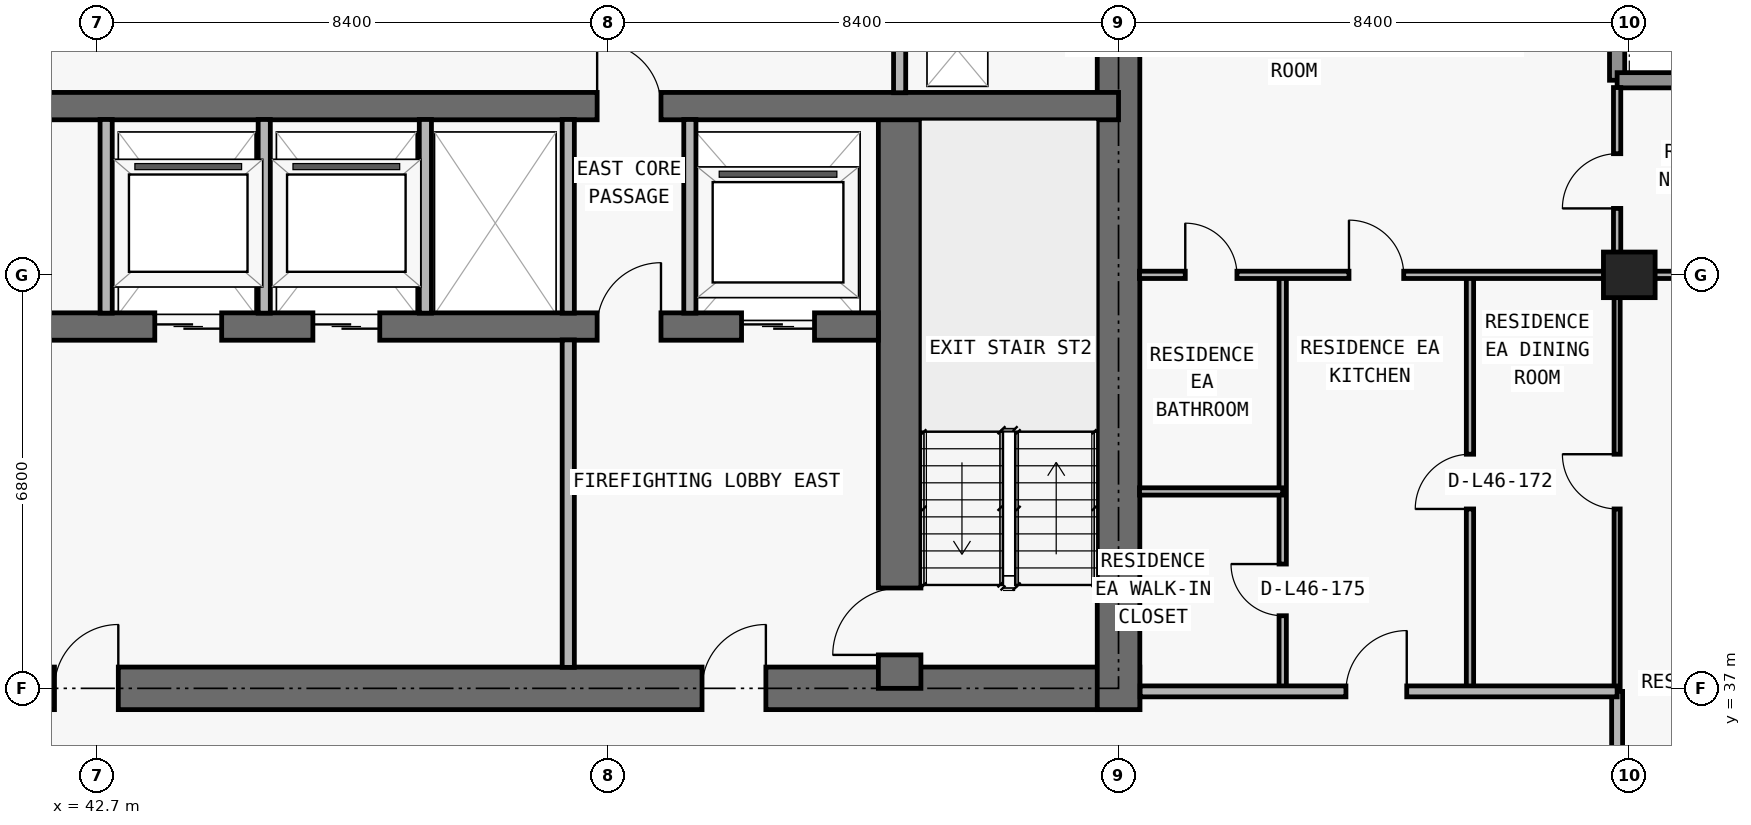
"""IFC4 building model, lengths in metres.
Left out: names, types, materials, properties, quantities, classifications, styles, units other than length and angle.
Written with IfcOpenShell. Run it as: python <this file> out.ifc"""

import sys

from ifc_helpers import new_model, si_unit, direction, frame, frame_2d, origin, origin_2d, place, context, subcontext, project, spatial, rectangle, extrude, element, fill, save


model = new_model("IFC4")
c1 = context("Model", 3, precision=1e-05, world=origin(), true_north=direction((0.0, 1.0)))
c2 = subcontext(c1, "Body", "Model", "MODEL_VIEW")
j1 = project(units=[si_unit("LENGTHUNIT", "METRE"), si_unit("PLANEANGLEUNIT", "RADIAN")], contexts=[c1])
p1 = place(None, origin())
s1 = spatial("IfcSite", under=j1, at=p1, CompositionType="ELEMENT")
p2 = place(p1, origin())
s2 = spatial("IfcBuilding", under=s1, at=p2, CompositionType="ELEMENT")
p3 = place(p2, frame((0.0, 0.0, 167.1)))
s3 = spatial("IfcBuildingStorey", under=s2, at=p3, CompositionType="ELEMENT", Elevation=167.1)
p4 = place(p3, frame((67.9, 43.8, 0.0), z_axis=(0.0, 0.0, 1.0), x_axis=(1.0, 0.0, 0.0)))
e1 = element("IfcColumn", 1, at=p4, inside=s3, PredefinedType="COLUMN", context=c2, shape_type="SweptSolid", body=[
    extrude(rectangle(XDim=0.85, YDim=0.75, at=origin_2d()), origin(), (0.0, 0.0, 1.0), 3.05),
])
p5 = place(p3, frame((17.95, 37.0, 0.0), z_axis=(0.0, 0.0, 1.0), x_axis=(1.0, 0.0, 0.0)))
e2 = element("IfcWall", 2, at=p5, inside=s3, PredefinedType="SHEAR", context=c2, shape_type="SweptSolid", body=[
    extrude(rectangle(XDim=41.9, YDim=0.7, at=frame_2d((20.95, 0.0))), origin(), (0.0, 0.0, 1.0), 3.05),
])
p6 = place(p5, frame((14.35, 0.0, 0.0)))
e3 = element("IfcOpeningElement", 3, at=p6, cuts=e2, PredefinedType="OPENING", context=c2, shape_type="SweptSolid", body=[
    extrude(rectangle(XDim=1.1, YDim=2.15, at=frame_2d((0.55, 1.075))), frame((0.0, 0.36, 0.0), z_axis=(0.0, -1.0, 0.0), x_axis=(1.0, 0.0, 0.0)), (0.0, 0.0, 1.0), 0.72),
])
p7 = place(p5, frame((6.2, 0.0, 0.0)))
e4 = element("IfcOpeningElement", 4, at=p7, cuts=e2, PredefinedType="OPENING", context=c2, shape_type="SweptSolid", body=[
    extrude(rectangle(XDim=1.05, YDim=2.15, at=frame_2d((0.525, 1.075))), frame((0.0, 0.36, 0.0), z_axis=(0.0, -1.0, 0.0), x_axis=(1.0, 0.0, 0.0)), (0.0, 0.0, 1.0), 0.72),
])
p8 = place(p5, frame((34.7, 0.0, 0.0)))
e5 = element("IfcOpeningElement", 5, at=p8, cuts=e2, PredefinedType="OPENING", context=c2, shape_type="SweptSolid", body=[
    extrude(rectangle(XDim=1.05, YDim=2.15, at=frame_2d((0.525, 1.075))), frame((0.0, 0.36, 0.0), z_axis=(0.0, -1.0, 0.0), x_axis=(1.0, 0.0, 0.0)), (0.0, 0.0, 1.0), 0.72),
])
p9 = place(p5, frame((10.812, 0.0, 0.0)))
e6 = element("IfcOpeningElement", 6, at=p9, cuts=e2, PredefinedType="OPENING", context=c2, shape_type="SweptSolid", body=[
    extrude(rectangle(XDim=1.05, YDim=2.15, at=frame_2d((0.525, 1.075))), frame((0.0, 0.36, 0.0), z_axis=(0.0, -1.0, 0.0), x_axis=(1.0, 0.0, 0.0)), (0.0, 0.0, 1.0), 0.72),
])
p10 = place(p5, frame((24.05, 0.0, 0.0)))
e7 = element("IfcOpeningElement", 7, at=p10, cuts=e2, PredefinedType="OPENING", context=c2, shape_type="SweptSolid", body=[
    extrude(rectangle(XDim=1.05, YDim=2.15, at=frame_2d((0.525, 1.075))), frame((0.0, 0.36, 0.0), z_axis=(0.0, -1.0, 0.0), x_axis=(1.0, 0.0, 0.0)), (0.0, 0.0, 1.0), 0.72),
])
p11 = place(p3, frame((59.5, 36.65, 0.0), z_axis=(0.0, 0.0, 1.0), x_axis=(0.0, 1.0, 0.0)))
e8 = element("IfcWall", 8, at=p11, inside=s3, PredefinedType="SHEAR", context=c2, shape_type="SweptSolid", body=[
    extrude(rectangle(XDim=13.95, YDim=0.7, at=frame_2d((6.975, 0.0))), origin(), (0.0, 0.0, 1.0), 3.05),
])
p12 = place(p3, frame((55.9, 37.0, 0.0), z_axis=(0.0, 0.0, 1.0), x_axis=(0.0, 1.0, 0.0)))
e9 = element("IfcWall", 9, at=p12, inside=s3, PredefinedType="SHEAR", context=c2, shape_type="SweptSolid", body=[
    extrude(rectangle(XDim=9.575, YDim=0.7, at=frame_2d((4.788, 0.0))), origin(), (0.0, 0.0, 1.0), 3.05),
])
p13 = place(p12, frame((0.55, 0.0, 0.0)))
e10 = element("IfcOpeningElement", 10, at=p13, cuts=e9, PredefinedType="OPENING", context=c2, shape_type="SweptSolid", body=[
    extrude(rectangle(XDim=1.1, YDim=2.15, at=frame_2d((0.55, 1.075))), frame((0.0, 0.36, 0.0), z_axis=(0.0, -1.0, 0.0), x_axis=(1.0, 0.0, 0.0)), (0.0, 0.0, 1.0), 0.72),
])
p14 = place(p3, frame((22.25, 42.95, 0.0), z_axis=(0.0, 0.0, 1.0), x_axis=(1.0, 0.0, 0.0)))
e11 = element("IfcWall", 11, at=p14, inside=s3, PredefinedType="SHEAR", context=c2, shape_type="SweptSolid", body=[
    extrude(rectangle(XDim=33.3, YDim=0.45, at=frame_2d((16.65, 0.0))), origin(), (0.0, 0.0, 1.0), 3.05),
])
p15 = place(p14, frame((1.05, 0.0, 0.0)))
e12 = element("IfcOpeningElement", 12, at=p15, cuts=e11, PredefinedType="OPENING", context=c2, shape_type="SweptSolid", body=[
    extrude(rectangle(XDim=1.2, YDim=2.2, at=frame_2d((0.6, 1.1))), frame((0.0, 0.235, 0.0), z_axis=(0.0, -1.0, 0.0), x_axis=(1.0, 0.0, 0.0)), (0.0, 0.0, 1.0), 0.47),
])
p16 = place(p14, frame((31.05, 0.0, 0.0)))
e13 = element("IfcOpeningElement", 13, at=p16, cuts=e11, PredefinedType="OPENING", context=c2, shape_type="SweptSolid", body=[
    extrude(rectangle(XDim=1.2, YDim=2.2, at=frame_2d((0.6, 1.1))), frame((0.0, 0.235, 0.0), z_axis=(0.0, -1.0, 0.0), x_axis=(1.0, 0.0, 0.0)), (0.0, 0.0, 1.0), 0.47),
])
p17 = place(p14, frame((21.4, 0.0, 0.0)))
e14 = element("IfcOpeningElement", 14, at=p17, cuts=e11, PredefinedType="OPENING", context=c2, shape_type="SweptSolid", body=[
    extrude(rectangle(XDim=1.1, YDim=2.2, at=frame_2d((0.55, 1.1))), frame((0.0, 0.235, 0.0), z_axis=(0.0, -1.0, 0.0), x_axis=(1.0, 0.0, 0.0)), (0.0, 0.0, 1.0), 0.47),
])
p18 = place(p14, frame((24.0, 0.0, 0.0)))
e15 = element("IfcOpeningElement", 15, at=p18, cuts=e11, PredefinedType="OPENING", context=c2, shape_type="SweptSolid", body=[
    extrude(rectangle(XDim=1.1, YDim=2.2, at=frame_2d((0.55, 1.1))), frame((0.0, 0.235, 0.0), z_axis=(0.0, -1.0, 0.0), x_axis=(1.0, 0.0, 0.0)), (0.0, 0.0, 1.0), 0.47),
])
p19 = place(p14, frame((3.625, 0.0, 0.0)))
e16 = element("IfcOpeningElement", 16, at=p19, cuts=e11, PredefinedType="OPENING", context=c2, shape_type="SweptSolid", body=[
    extrude(rectangle(XDim=1.05, YDim=2.15, at=frame_2d((0.525, 1.075))), frame((0.0, 0.235, 0.0), z_axis=(0.0, -1.0, 0.0), x_axis=(1.0, 0.0, 0.0)), (0.0, 0.0, 1.0), 0.47),
])
p20 = place(p14, frame((28.675, 0.0, 0.0)))
e17 = element("IfcOpeningElement", 17, at=p20, cuts=e11, PredefinedType="OPENING", context=c2, shape_type="SweptSolid", body=[
    extrude(rectangle(XDim=1.05, YDim=2.15, at=frame_2d((0.525, 1.075))), frame((0.0, 0.235, 0.0), z_axis=(0.0, -1.0, 0.0), x_axis=(1.0, 0.0, 0.0)), (0.0, 0.0, 1.0), 0.47),
])
p21 = place(p14, frame((15.975, 0.0, 0.0)))
e18 = element("IfcOpeningElement", 18, at=p21, cuts=e11, PredefinedType="OPENING", context=c2, shape_type="SweptSolid", body=[
    extrude(rectangle(XDim=1.0, YDim=2.2, at=frame_2d((0.5, 1.1))), frame((0.0, 0.235, 0.0), z_axis=(0.0, -1.0, 0.0), x_axis=(1.0, 0.0, 0.0)), (0.0, 0.0, 1.0), 0.47),
])
p22 = place(p3, frame((18.3, 46.575, 0.0), z_axis=(0.0, 0.0, 1.0), x_axis=(1.0, 0.0, 0.0)))
e19 = element("IfcWall", 19, at=p22, inside=s3, PredefinedType="SHEAR", context=c2, shape_type="SweptSolid", body=[
    extrude(rectangle(XDim=41.2, YDim=0.45, at=frame_2d((20.6, 0.0))), origin(), (0.0, 0.0, 1.0), 3.05),
])
p23 = place(p22, frame((7.575, 0.0, 0.0)))
e20 = element("IfcOpeningElement", 20, at=p23, cuts=e19, PredefinedType="OPENING", context=c2, shape_type="SweptSolid", body=[
    extrude(rectangle(XDim=1.05, YDim=2.15, at=frame_2d((0.525, 1.075))), frame((0.0, 0.235, 0.0), z_axis=(0.0, -1.0, 0.0), x_axis=(1.0, 0.0, 0.0)), (0.0, 0.0, 1.0), 0.47),
])
p24 = place(p22, frame((32.625, 0.0, 0.0)))
e21 = element("IfcOpeningElement", 21, at=p24, cuts=e19, PredefinedType="OPENING", context=c2, shape_type="SweptSolid", body=[
    extrude(rectangle(XDim=1.05, YDim=2.15, at=frame_2d((0.525, 1.075))), frame((0.0, 0.235, 0.0), z_axis=(0.0, -1.0, 0.0), x_axis=(1.0, 0.0, 0.0)), (0.0, 0.0, 1.0), 0.47),
])
p25 = place(p3, frame((67.7, 50.45, 0.0), z_axis=(0.0, 0.0, 1.0), x_axis=(0.0, -1.0, 0.0)))
e22 = element("IfcWall", 22, at=p25, inside=s3, PredefinedType="ELEMENTEDWALL", context=c2, shape_type="SweptSolid", body=[
    extrude(rectangle(XDim=3.45, YDim=0.25, at=frame_2d((1.725, 0.0))), origin(), (0.0, 0.0, 1.0), 3.05),
])
p26 = place(p3, frame((67.7, 47.0, 0.0), z_axis=(0.0, 0.0, 1.0), x_axis=(1.0, 0.0, 0.0)))
e23 = element("IfcWall", 23, at=p26, inside=s3, PredefinedType="ELEMENTEDWALL", context=c2, shape_type="SweptSolid", body=[
    extrude(rectangle(XDim=3.85, YDim=0.25, at=frame_2d((1.925, 0.0))), origin(), (0.0, 0.0, 1.0), 3.05),
])
for number, where, z_axis, x_axis in (
    (24, (42.85, 43.17, 0.0), (0.0, 0.0, 1.0), (0.0, 1.0, 0.0)),
    (25, (45.45, 43.17, 0.0), (0.0, 0.0, 1.0), (0.0, 1.0, 0.0)),
    (26, (48.1, 43.17, 0.0), (0.0, 0.0, 1.0), (0.0, 1.0, 0.0)),
):
    element("IfcWall", number, at=place(p3, frame(where, z_axis=z_axis, x_axis=x_axis)), inside=s3, PredefinedType="PARTITIONING", context=c2, shape_type="SweptSolid", body=[
        extrude(rectangle(XDim=3.185, YDim=0.2, at=frame_2d((1.593, 0.0))), origin(), (0.0, 0.0, 1.0), 3.05),
    ])
p27 = place(p3, frame((50.45, 37.345, 0.0), z_axis=(0.0, 0.0, 1.0), x_axis=(0.0, 1.0, 0.0)))
e27 = element("IfcWall", 27, at=p27, inside=s3, PredefinedType="PARTITIONING", context=c2, shape_type="SweptSolid", body=[
    extrude(rectangle(XDim=5.385, YDim=0.2, at=frame_2d((2.692, 0.0))), origin(), (0.0, 0.0, 1.0), 3.05),
])
for number, where, z_axis, x_axis in (
    (28, (50.45, 43.17, 0.0), (0.0, 0.0, 1.0), (0.0, 1.0, 0.0)),
    (29, (52.45, 43.17, 0.0), (0.0, 0.0, 1.0), (0.0, 1.0, 0.0)),
):
    element("IfcWall", number, at=place(p3, frame(where, z_axis=z_axis, x_axis=x_axis)), inside=s3, PredefinedType="PARTITIONING", context=c2, shape_type="SweptSolid", body=[
        extrude(rectangle(XDim=3.185, YDim=0.2, at=frame_2d((1.593, 0.0))), origin(), (0.0, 0.0, 1.0), 3.05),
    ])
p28 = place(p3, frame((55.9, 46.795, 0.0), z_axis=(0.0, 0.0, 1.0), x_axis=(0.0, 1.0, 0.0)))
e30 = element("IfcWall", 30, at=p28, inside=s3, PredefinedType="PARTITIONING", context=c2, shape_type="SweptSolid", body=[
    extrude(rectangle(XDim=3.16, YDim=0.2, at=frame_2d((1.58, 0.0))), origin(), (0.0, 0.0, 1.0), 3.05),
])
p29 = place(p3, frame((62.2, 37.0, 0.0), z_axis=(0.0, 0.0, 1.0), x_axis=(0.0, 1.0, 0.0)))
e31 = element("IfcWall", 31, at=p29, inside=s3, PredefinedType="PARTITIONING", context=c2, shape_type="SweptSolid", body=[
    extrude(rectangle(XDim=6.8, YDim=0.12, at=frame_2d((3.4, 0.0))), origin(), (0.0, 0.0, 1.0), 3.05),
])
p30 = place(p29, frame((1.194, 0.0, 0.0)))
e32 = element("IfcOpeningElement", 32, at=p30, cuts=e31, PredefinedType="OPENING", context=c2, shape_type="SweptSolid", body=[
    extrude(rectangle(XDim=0.85, YDim=2.1, at=frame_2d((0.425, 1.05))), frame((0.0, 0.07, 0.0), z_axis=(0.0, -1.0, 0.0), x_axis=(1.0, 0.0, 0.0)), (0.0, 0.0, 1.0), 0.14),
])
p31 = place(p3, frame((65.28, 37.0, 0.0), z_axis=(0.0, 0.0, 1.0), x_axis=(0.0, 1.0, 0.0)))
e33 = element("IfcWall", 33, at=p31, inside=s3, PredefinedType="PARTITIONING", context=c2, shape_type="SweptSolid", body=[
    extrude(rectangle(XDim=6.8, YDim=0.12, at=frame_2d((3.4, 0.0))), origin(), (0.0, 0.0, 1.0), 3.05),
])
p32 = place(p31, frame((2.95, 0.0, 0.0)))
e34 = element("IfcOpeningElement", 34, at=p32, cuts=e33, PredefinedType="OPENING", context=c2, shape_type="SweptSolid", body=[
    extrude(rectangle(XDim=0.9, YDim=2.15, at=frame_2d((0.45, 1.075))), frame((0.0, 0.07, 0.0), z_axis=(0.0, -1.0, 0.0), x_axis=(1.0, 0.0, 0.0)), (0.0, 0.0, 1.0), 0.14),
])
p33 = place(p3, frame((67.7, 33.705, 0.0), z_axis=(0.0, 0.0, 1.0), x_axis=(0.0, 1.0, 0.0)))
e35 = element("IfcWall", 35, at=p33, inside=s3, PredefinedType="PARTITIONING", context=c2, shape_type="SweptSolid", body=[
    extrude(rectangle(XDim=3.245, YDim=0.18, at=frame_2d((1.623, 0.0))), origin(), (0.0, 0.0, 1.0), 2.263),
])
p34 = place(p3, frame((67.7, 37.0, 0.0), z_axis=(0.0, 0.0, 1.0), x_axis=(0.0, 1.0, 0.0)))
e36 = element("IfcWall", 36, at=p34, inside=s3, PredefinedType="MOVABLE", context=c2, shape_type="SweptSolid", body=[
    extrude(rectangle(XDim=6.8, YDim=0.1, at=frame_2d((3.4, 0.0))), origin(), (0.0, 0.0, 1.0), 2.263),
])
p35 = place(p34, frame((2.95, 0.0, 0.0)))
e37 = element("IfcOpeningElement", 37, at=p35, cuts=e36, PredefinedType="OPENING", context=c2, shape_type="SweptSolid", body=[
    extrude(rectangle(XDim=0.9, YDim=2.15, at=frame_2d((0.45, 1.075))), frame((0.0, 0.06, 0.0), z_axis=(0.0, -1.0, 0.0), x_axis=(1.0, 0.0, 0.0)), (0.0, 0.0, 1.0), 0.12),
])
p36 = place(p3, frame((67.7, 43.805, 0.0), z_axis=(0.0, 0.0, 1.0), x_axis=(0.0, 1.0, 0.0)))
e38 = element("IfcWall", 38, at=p36, inside=s3, PredefinedType="PARTITIONING", context=c2, shape_type="SweptSolid", body=[
    extrude(rectangle(XDim=3.075, YDim=0.12, at=frame_2d((1.538, 0.0))), origin(), (0.0, 0.0, 1.0), 3.05),
])
p37 = place(p36, frame((1.087, 0.0, 0.0)))
e39 = element("IfcOpeningElement", 39, at=p37, cuts=e38, PredefinedType="OPENING", context=c2, shape_type="SweptSolid", body=[
    extrude(rectangle(XDim=0.9, YDim=2.15, at=frame_2d((0.45, 1.075))), frame((0.0, 0.07, 0.0), z_axis=(0.0, -1.0, 0.0), x_axis=(1.0, 0.0, 0.0)), (0.0, 0.0, 1.0), 0.14),
])
p38 = place(p3, frame((59.855, 36.95, 0.0), z_axis=(0.0, 0.0, 1.0), x_axis=(1.0, 0.0, 0.0)))
e40 = element("IfcWall", 40, at=p38, inside=s3, PredefinedType="PARTITIONING", context=c2, shape_type="SweptSolid", body=[
    extrude(rectangle(XDim=7.845, YDim=0.18, at=frame_2d((3.922, 0.0))), origin(), (0.0, 0.0, 1.0), 3.05),
])
p39 = place(p38, frame((3.385, 0.0, 0.0)))
e41 = element("IfcOpeningElement", 41, at=p39, cuts=e40, PredefinedType="OPENING", context=c2, shape_type="SweptSolid", body=[
    extrude(rectangle(XDim=1.0, YDim=2.2, at=frame_2d((0.5, 1.1))), frame((0.0, 0.1, 0.0), z_axis=(0.0, -1.0, 0.0), x_axis=(1.0, 0.0, 0.0)), (0.0, 0.0, 1.0), 0.2),
])
p40 = place(p3, frame((59.845, 40.238, 0.0), z_axis=(0.0, 0.0, 1.0), x_axis=(1.0, 0.0, 0.0)))
e42 = element("IfcWall", 42, at=p40, inside=s3, PredefinedType="PARTITIONING", context=c2, shape_type="SweptSolid", body=[
    extrude(rectangle(XDim=2.355, YDim=0.12, at=frame_2d((1.177, 0.0))), origin(), (0.0, 0.0, 1.0), 3.05),
])
p41 = place(p3, frame((59.845, 43.8, 0.0), z_axis=(0.0, 0.0, 1.0), x_axis=(1.0, 0.0, 0.0)))
e43 = element("IfcWall", 43, at=p41, inside=s3, PredefinedType="PARTITIONING", context=c2, shape_type="SweptSolid", body=[
    extrude(rectangle(XDim=11.56, YDim=0.12, at=frame_2d((5.78, 0.0))), origin(), (0.0, 0.0, 1.0), 2.418),
])
p42 = place(p41, frame((3.445, 0.0, 0.0)))
e44 = element("IfcOpeningElement", 44, at=p42, cuts=e43, PredefinedType="OPENING", context=c2, shape_type="SweptSolid", body=[
    extrude(rectangle(XDim=0.9, YDim=2.15, at=frame_2d((0.45, 1.075))), frame((0.0, 0.07, 0.0), z_axis=(0.0, -1.0, 0.0), x_axis=(1.0, 0.0, 0.0)), (0.0, 0.0, 1.0), 0.14),
])
p43 = place(p41, frame((0.752, 0.0, 0.0)))
e45 = element("IfcOpeningElement", 45, at=p43, cuts=e43, PredefinedType="OPENING", context=c2, shape_type="SweptSolid", body=[
    extrude(rectangle(XDim=0.85, YDim=2.1, at=frame_2d((0.425, 1.05))), frame((0.0, 0.07, 0.0), z_axis=(0.0, -1.0, 0.0), x_axis=(1.0, 0.0, 0.0)), (0.0, 0.0, 1.0), 0.14),
])
p44 = place(p16, origin())
e46 = element("IfcDoor", 46, at=p44, inside=s3, OperationType="DOUBLE_DOOR_SLIDING", PredefinedType="DOOR", context=c2, shape_type="SweptSolid", body=[
    extrude(rectangle(XDim=1.2, YDim=2.2, at=frame_2d((0.6, 1.1))), frame((0.0, 0.025, 0.0), z_axis=(0.0, -1.0, 0.0), x_axis=(1.0, 0.0, 0.0)), (0.0, 0.0, 1.0), 0.05),
])
fill(e13, e46)
p45 = place(p17, origin())
e47 = element("IfcDoor", 47, at=p45, inside=s3, OperationType="DOUBLE_DOOR_SLIDING", PredefinedType="DOOR", context=c2, shape_type="SweptSolid", body=[
    extrude(rectangle(XDim=1.1, YDim=2.2, at=frame_2d((0.55, 1.1))), frame((0.0, 0.025, 0.0), z_axis=(0.0, -1.0, 0.0), x_axis=(1.0, 0.0, 0.0)), (0.0, 0.0, 1.0), 0.05),
])
fill(e14, e47)
p46 = place(p18, origin())
e48 = element("IfcDoor", 48, at=p46, inside=s3, OperationType="DOUBLE_DOOR_SLIDING", PredefinedType="DOOR", context=c2, shape_type="SweptSolid", body=[
    extrude(rectangle(XDim=1.1, YDim=2.2, at=frame_2d((0.55, 1.1))), frame((0.0, 0.025, 0.0), z_axis=(0.0, -1.0, 0.0), x_axis=(1.0, 0.0, 0.0)), (0.0, 0.0, 1.0), 0.05),
])
fill(e15, e48)
p47 = place(p8, origin())
e49 = element("IfcDoor", 49, at=p47, inside=s3, OperationType="SINGLE_SWING_RIGHT", PredefinedType="DOOR", context=c2, shape_type="SweptSolid", body=[
    extrude(rectangle(XDim=1.05, YDim=2.15, at=frame_2d((0.525, 1.075))), frame((0.0, 0.025, 0.0), z_axis=(0.0, -1.0, 0.0), x_axis=(1.0, 0.0, 0.0)), (0.0, 0.0, 1.0), 0.05),
])
fill(e5, e49)
p48 = place(p13, origin())
e50 = element("IfcDoor", 50, at=p48, inside=s3, OperationType="SINGLE_SWING_LEFT", PredefinedType="DOOR", context=c2, shape_type="SweptSolid", body=[
    extrude(rectangle(XDim=1.1, YDim=2.15, at=frame_2d((0.55, 1.075))), frame((0.0, 0.025, 0.0), z_axis=(0.0, -1.0, 0.0), x_axis=(1.0, 0.0, 0.0)), (0.0, 0.0, 1.0), 0.05),
])
fill(e10, e50)
p49 = place(p20, origin())
e51 = element("IfcDoor", 51, at=p49, inside=s3, OperationType="SINGLE_SWING_RIGHT", PredefinedType="DOOR", context=c2, shape_type="SweptSolid", body=[
    extrude(rectangle(XDim=1.05, YDim=2.15, at=frame_2d((0.525, 1.075))), frame((0.0, 0.025, 0.0), z_axis=(0.0, -1.0, 0.0), x_axis=(1.0, 0.0, 0.0)), (0.0, 0.0, 1.0), 0.05),
])
fill(e17, e51)
p50 = place(p10, origin())
e52 = element("IfcDoor", 52, at=p50, inside=s3, OperationType="SINGLE_SWING_RIGHT", PredefinedType="DOOR", context=c2, shape_type="SweptSolid", body=[
    extrude(rectangle(XDim=1.05, YDim=2.15, at=frame_2d((0.525, 1.075))), frame((0.0, 0.025, 0.0), z_axis=(0.0, -1.0, 0.0), x_axis=(1.0, 0.0, 0.0)), (0.0, 0.0, 1.0), 0.05),
])
fill(e7, e52)
p51 = place(p24, origin())
e53 = element("IfcDoor", 53, at=p51, inside=s3, OperationType="SINGLE_SWING_LEFT", PredefinedType="DOOR", context=c2, shape_type="SweptSolid", body=[
    extrude(rectangle(XDim=1.05, YDim=2.15, at=frame_2d((0.525, 1.075))), frame((0.0, 0.025, 0.0), z_axis=(0.0, -1.0, 0.0), x_axis=(1.0, 0.0, 0.0)), (0.0, 0.0, 1.0), 0.05),
])
fill(e21, e53)
p52 = place(p32, origin())
e54 = element("IfcDoor", 54, at=p52, inside=s3, OperationType="SINGLE_SWING_LEFT", PredefinedType="DOOR", context=c2, shape_type="SweptSolid", body=[
    extrude(rectangle(XDim=0.9, YDim=2.15, at=frame_2d((0.45, 1.075))), frame((0.0, 0.025, 0.0), z_axis=(0.0, -1.0, 0.0), x_axis=(1.0, 0.0, 0.0)), (0.0, 0.0, 1.0), 0.05),
])
fill(e34, e54)
p53 = place(p39, origin())
e55 = element("IfcDoor", 55, at=p53, inside=s3, OperationType="SINGLE_SWING_RIGHT", PredefinedType="DOOR", context=c2, shape_type="SweptSolid", body=[
    extrude(rectangle(XDim=1.0, YDim=2.2, at=frame_2d((0.5, 1.1))), frame((0.0, 0.025, 0.0), z_axis=(0.0, -1.0, 0.0), x_axis=(1.0, 0.0, 0.0)), (0.0, 0.0, 1.0), 0.05),
])
fill(e41, e55)
p54 = place(p42, origin())
e56 = element("IfcDoor", 56, at=p54, inside=s3, OperationType="SINGLE_SWING_LEFT", PredefinedType="DOOR", context=c2, shape_type="SweptSolid", body=[
    extrude(rectangle(XDim=0.9, YDim=2.15, at=frame_2d((0.45, 1.075))), frame((0.0, 0.025, 0.0), z_axis=(0.0, -1.0, 0.0), x_axis=(1.0, 0.0, 0.0)), (0.0, 0.0, 1.0), 0.05),
])
fill(e44, e56)
p55 = place(p30, origin())
e57 = element("IfcDoor", 57, at=p55, inside=s3, OperationType="SINGLE_SWING_RIGHT", PredefinedType="DOOR", context=c2, shape_type="SweptSolid", body=[
    extrude(rectangle(XDim=0.85, YDim=2.1, at=frame_2d((0.425, 1.05))), frame((0.0, 0.025, 0.0), z_axis=(0.0, -1.0, 0.0), x_axis=(1.0, 0.0, 0.0)), (0.0, 0.0, 1.0), 0.05),
])
fill(e32, e57)
p56 = place(p43, origin())
e58 = element("IfcDoor", 58, at=p56, inside=s3, OperationType="SINGLE_SWING_LEFT", PredefinedType="DOOR", context=c2, shape_type="SweptSolid", body=[
    extrude(rectangle(XDim=0.85, YDim=2.1, at=frame_2d((0.425, 1.05))), frame((0.0, 0.025, 0.0), z_axis=(0.0, -1.0, 0.0), x_axis=(1.0, 0.0, 0.0)), (0.0, 0.0, 1.0), 0.05),
])
fill(e45, e58)
p57 = place(p35, origin())
e59 = element("IfcDoor", 59, at=p57, inside=s3, OperationType="SINGLE_SWING_RIGHT", PredefinedType="DOOR", context=c2, shape_type="SweptSolid", body=[
    extrude(rectangle(XDim=0.9, YDim=2.15, at=frame_2d((0.45, 1.075))), frame((0.0, 0.025, 0.0), z_axis=(0.0, -1.0, 0.0), x_axis=(1.0, 0.0, 0.0)), (0.0, 0.0, 1.0), 0.05),
])
fill(e37, e59)
p58 = place(p37, origin())
e60 = element("IfcDoor", 60, at=p58, inside=s3, OperationType="SINGLE_SWING_LEFT", PredefinedType="DOOR", context=c2, shape_type="SweptSolid", body=[
    extrude(rectangle(XDim=0.9, YDim=2.15, at=frame_2d((0.45, 1.075))), frame((0.0, 0.025, 0.0), z_axis=(0.0, -1.0, 0.0), x_axis=(1.0, 0.0, 0.0)), (0.0, 0.0, 1.0), 0.05),
])
fill(e39, e60)
save(model, sys.argv[1])
